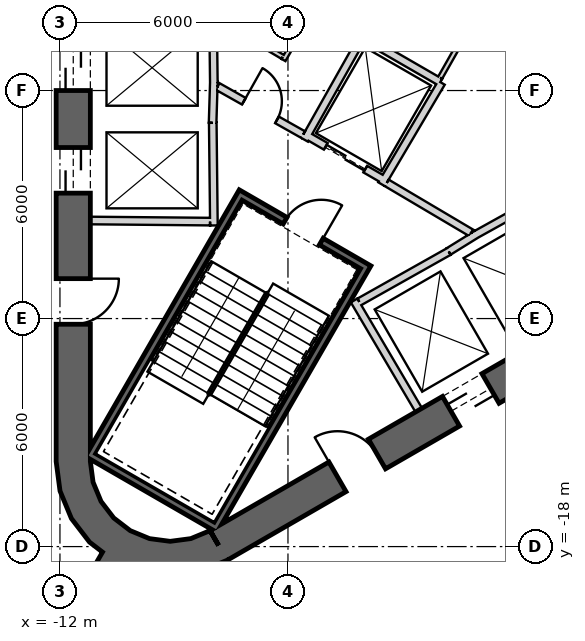
"""IFC4 building model, lengths in metres.
Left out: names, types, materials, properties, quantities, classifications, styles, units other than length and angle.
Written with IfcOpenShell. Run it as: python <this file> out.ifc"""

import sys

from ifc_helpers import new_model, si_unit, direction, frame, frame_2d, origin, place, context, subcontext, project, spatial, polyline, rectangle, outline, extrude, element, fill, save


model = new_model("IFC4")
c1 = context("Model", 3, precision=1e-05, world=origin(), true_north=direction((0.0, 1.0)))
c2 = subcontext(c1, "Body", "Model", "MODEL_VIEW")
j1 = project(units=[si_unit("LENGTHUNIT", "METRE"), si_unit("PLANEANGLEUNIT", "RADIAN")], contexts=[c1])
p1 = place(None, origin())
s1 = spatial("IfcSite", under=j1, at=p1, CompositionType="ELEMENT")
p2 = place(p1, origin())
s2 = spatial("IfcBuilding", under=s1, at=p2, CompositionType="ELEMENT")
p3 = place(p2, frame((0.0, 0.0, 265.2)))
s3 = spatial("IfcBuildingStorey", under=s2, at=p3, CompositionType="ELEMENT", Elevation=265.2)
p4 = place(p3, frame((-11.65, 15.762, 0.0), z_axis=(0.0, 0.0, 1.0), x_axis=(0.0, -1.0, 0.0)))
e1 = element("IfcWall", 1, at=p4, inside=s3, PredefinedType="SHEAR", context=c2, shape_type="SweptSolid", body=[
    extrude(rectangle(XDim=31.523, YDim=0.9, at=frame_2d((15.762, 0.0))), origin(), (0.0, 0.0, 1.0), 4.0),
])
p5 = place(p4, frame((7.062, 0.0, 0.0)))
e2 = element("IfcOpeningElement", 2, at=p5, cuts=e1, PredefinedType="OPENING", context=c2, shape_type="SweptSolid", body=[
    extrude(rectangle(XDim=1.2, YDim=2.4, at=frame_2d((0.6, 1.2))), frame((0.0, 0.46, 0.0), z_axis=(0.0, -1.0, 0.0), x_axis=(1.0, 0.0, 0.0)), (0.0, 0.0, 1.0), 0.92),
])
p6 = place(p4, frame((9.762, 0.0, 0.0)))
e3 = element("IfcOpeningElement", 3, at=p6, cuts=e1, PredefinedType="OPENING", context=c2, shape_type="SweptSolid", body=[
    extrude(rectangle(XDim=1.2, YDim=2.4, at=frame_2d((0.6, 1.2))), frame((0.0, 0.46, 0.0), z_axis=(0.0, -1.0, 0.0), x_axis=(1.0, 0.0, 0.0)), (0.0, 0.0, 1.0), 0.92),
])
p7 = place(p4, frame((12.462, 0.0, 0.0)))
e4 = element("IfcOpeningElement", 4, at=p7, cuts=e1, PredefinedType="OPENING", context=c2, shape_type="SweptSolid", body=[
    extrude(rectangle(XDim=1.2, YDim=2.4, at=frame_2d((0.6, 1.2))), frame((0.0, 0.46, 0.0), z_axis=(0.0, -1.0, 0.0), x_axis=(1.0, 0.0, 0.0)), (0.0, 0.0, 1.0), 0.92),
])
p8 = place(p4, frame((15.162, 0.0, 0.0)))
e5 = element("IfcOpeningElement", 5, at=p8, cuts=e1, PredefinedType="OPENING", context=c2, shape_type="SweptSolid", body=[
    extrude(rectangle(XDim=1.2, YDim=2.4, at=frame_2d((0.6, 1.2))), frame((0.0, 0.46, 0.0), z_axis=(0.0, -1.0, 0.0), x_axis=(1.0, 0.0, 0.0)), (0.0, 0.0, 1.0), 0.92),
])
p9 = place(p4, frame((17.862, 0.0, 0.0)))
e6 = element("IfcOpeningElement", 6, at=p9, cuts=e1, PredefinedType="OPENING", context=c2, shape_type="SweptSolid", body=[
    extrude(rectangle(XDim=1.2, YDim=2.4, at=frame_2d((0.6, 1.2))), frame((0.0, 0.46, 0.0), z_axis=(0.0, -1.0, 0.0), x_axis=(1.0, 0.0, 0.0)), (0.0, 0.0, 1.0), 0.92),
])
p10 = place(p4, frame((20.562, 0.0, 0.0)))
e7 = element("IfcOpeningElement", 7, at=p10, cuts=e1, PredefinedType="OPENING", context=c2, shape_type="SweptSolid", body=[
    extrude(rectangle(XDim=1.2, YDim=2.4, at=frame_2d((0.6, 1.2))), frame((0.0, 0.46, 0.0), z_axis=(0.0, -1.0, 0.0), x_axis=(1.0, 0.0, 0.0)), (0.0, 0.0, 1.0), 0.92),
])
p11 = place(p4, frame((23.262, 0.0, 0.0)))
e8 = element("IfcOpeningElement", 8, at=p11, cuts=e1, PredefinedType="OPENING", context=c2, shape_type="SweptSolid", body=[
    extrude(rectangle(XDim=1.2, YDim=2.4, at=frame_2d((0.6, 1.2))), frame((0.0, 0.46, 0.0), z_axis=(0.0, -1.0, 0.0), x_axis=(1.0, 0.0, 0.0)), (0.0, 0.0, 1.0), 0.92),
])
p12 = place(p4, frame((3.612, 0.0, 0.0)))
e9 = element("IfcOpeningElement", 9, at=p12, cuts=e1, PredefinedType="OPENING", context=c2, shape_type="SweptSolid", body=[
    extrude(rectangle(XDim=1.2, YDim=2.4, at=frame_2d((0.6, 1.2))), frame((0.0, 0.46, 0.0), z_axis=(0.0, -1.0, 0.0), x_axis=(1.0, 0.0, 0.0)), (0.0, 0.0, 1.0), 0.92),
])
p13 = place(p4, frame((26.712, 0.0, 0.0)))
e10 = element("IfcOpeningElement", 10, at=p13, cuts=e1, PredefinedType="OPENING", context=c2, shape_type="SweptSolid", body=[
    extrude(rectangle(XDim=1.2, YDim=2.4, at=frame_2d((0.6, 1.2))), frame((0.0, 0.46, 0.0), z_axis=(0.0, -1.0, 0.0), x_axis=(1.0, 0.0, 0.0)), (0.0, 0.0, 1.0), 0.92),
])
p14 = place(p3, frame((-7.825, -17.97, 0.0), z_axis=(0.0, 0.0, 1.0), x_axis=(0.866028369851, 0.499994862586, 0.0)))
e11 = element("IfcWall", 11, at=p14, inside=s3, PredefinedType="SHEAR", context=c2, shape_type="SweptSolid", body=[
    extrude(rectangle(XDim=31.523, YDim=0.9, at=frame_2d((15.762, 0.0))), origin(), (0.0, 0.0, 1.0), 4.0),
])
p15 = place(p14, frame((7.062, 0.0, 0.0)))
e12 = element("IfcOpeningElement", 12, at=p15, cuts=e11, PredefinedType="OPENING", context=c2, shape_type="SweptSolid", body=[
    extrude(rectangle(XDim=1.2, YDim=2.4, at=frame_2d((0.6, 1.2))), frame((0.0, 0.46, 0.0), z_axis=(0.0, -1.0, 0.0), x_axis=(1.0, 0.0, 0.0)), (0.0, 0.0, 1.0), 0.92),
])
p16 = place(p14, frame((9.762, 0.0, 0.0)))
e13 = element("IfcOpeningElement", 13, at=p16, cuts=e11, PredefinedType="OPENING", context=c2, shape_type="SweptSolid", body=[
    extrude(rectangle(XDim=1.2, YDim=2.4, at=frame_2d((0.6, 1.2))), frame((0.0, 0.46, 0.0), z_axis=(0.0, -1.0, 0.0), x_axis=(1.0, 0.0, 0.0)), (0.0, 0.0, 1.0), 0.92),
])
p17 = place(p14, frame((12.462, 0.0, 0.0)))
e14 = element("IfcOpeningElement", 14, at=p17, cuts=e11, PredefinedType="OPENING", context=c2, shape_type="SweptSolid", body=[
    extrude(rectangle(XDim=1.2, YDim=2.4, at=frame_2d((0.6, 1.2))), frame((0.0, 0.46, 0.0), z_axis=(0.0, -1.0, 0.0), x_axis=(1.0, 0.0, 0.0)), (0.0, 0.0, 1.0), 0.92),
])
p18 = place(p14, frame((15.162, 0.0, 0.0)))
e15 = element("IfcOpeningElement", 15, at=p18, cuts=e11, PredefinedType="OPENING", context=c2, shape_type="SweptSolid", body=[
    extrude(rectangle(XDim=1.2, YDim=2.4, at=frame_2d((0.6, 1.2))), frame((0.0, 0.46, 0.0), z_axis=(0.0, -1.0, 0.0), x_axis=(1.0, 0.0, 0.0)), (0.0, 0.0, 1.0), 0.92),
])
p19 = place(p14, frame((17.862, 0.0, 0.0)))
e16 = element("IfcOpeningElement", 16, at=p19, cuts=e11, PredefinedType="OPENING", context=c2, shape_type="SweptSolid", body=[
    extrude(rectangle(XDim=1.2, YDim=2.4, at=frame_2d((0.6, 1.2))), frame((0.0, 0.46, 0.0), z_axis=(0.0, -1.0, 0.0), x_axis=(1.0, 0.0, 0.0)), (0.0, 0.0, 1.0), 0.92),
])
p20 = place(p14, frame((20.562, 0.0, 0.0)))
e17 = element("IfcOpeningElement", 17, at=p20, cuts=e11, PredefinedType="OPENING", context=c2, shape_type="SweptSolid", body=[
    extrude(rectangle(XDim=1.2, YDim=2.4, at=frame_2d((0.6, 1.2))), frame((0.0, 0.46, 0.0), z_axis=(0.0, -1.0, 0.0), x_axis=(1.0, 0.0, 0.0)), (0.0, 0.0, 1.0), 0.92),
])
p21 = place(p14, frame((26.712, 0.0, 0.0)))
e18 = element("IfcOpeningElement", 18, at=p21, cuts=e11, PredefinedType="OPENING", context=c2, shape_type="SweptSolid", body=[
    extrude(rectangle(XDim=1.2, YDim=2.4, at=frame_2d((0.6, 1.2))), frame((0.0, 0.46, 0.0), z_axis=(0.0, -1.0, 0.0), x_axis=(1.0, 0.0, 0.0)), (0.0, 0.0, 1.0), 0.92),
])
p22 = place(p14, frame((3.612, 0.0, 0.0)))
e19 = element("IfcOpeningElement", 19, at=p22, cuts=e11, PredefinedType="OPENING", context=c2, shape_type="SweptSolid", body=[
    extrude(rectangle(XDim=1.2, YDim=2.4, at=frame_2d((0.6, 1.2))), frame((0.0, 0.46, 0.0), z_axis=(0.0, -1.0, 0.0), x_axis=(1.0, 0.0, 0.0)), (0.0, 0.0, 1.0), 0.92),
])
p23 = place(p3, origin())
e20 = element("IfcWall", 20, at=p23, inside=s3, PredefinedType="SHEAR", context=c2, shape_type="SweptSolid", body=[
    extrude(outline(polyline([(-12.1, -15.762), (-11.998, -16.538), (-11.698, -17.262), (-11.221, -17.883), (-10.6, -18.36), (-9.876, -18.659), (-9.1, -18.762), (-8.323, -18.659), (-7.6, -18.36), (-8.05, -17.58), (-8.556, -17.79), (-9.1, -17.862), (-9.644, -17.79), (-10.15, -17.58), (-10.585, -17.247), (-10.919, -16.812), (-11.128, -16.305), (-11.2, -15.762), (-12.1, -15.762)])), origin(), (0.0, 0.0, 1.0), 4.0),
])
p24 = place(p3, frame((-10.575, -18.316, 0.0), z_axis=(0.0, 0.0, 1.0), x_axis=(-0.500007350791, -0.866021159762, 0.0)))
e21 = element("IfcWall", 21, at=p24, inside=s3, PredefinedType="SHEAR", context=c2, shape_type="SweptSolid", body=[
    extrude(rectangle(XDim=9.965, YDim=0.7, at=frame_2d((4.982, 0.0))), origin(), (0.0, 0.0, 1.0), 4.0),
])
p25 = place(p3, frame((-7.95, -5.772, 0.0), z_axis=(0.0, 0.0, 1.0), x_axis=(-0.030803413295, -0.999525462272, 0.0)))
e22 = element("IfcWall", 22, at=p25, inside=s3, PredefinedType="PLUMBINGWALL", context=c2, shape_type="SweptSolid", body=[
    extrude(rectangle(XDim=1.078, YDim=0.2, at=frame_2d((0.539, 0.0))), origin(), (0.0, 0.0, 1.0), 3.7),
])
p26 = place(p3, frame((-7.971, -4.05, 0.0), z_axis=(0.0, 0.0, 1.0), x_axis=(0.012042535896, -0.999927486035, 0.0)))
e23 = element("IfcWall", 23, at=p26, inside=s3, PredefinedType="PLUMBINGWALL", context=c2, shape_type="SweptSolid", body=[
    extrude(rectangle(XDim=1.845, YDim=0.2, at=frame_2d((0.922, 0.0))), origin(), (0.0, 0.0, 1.0), 3.7),
])
p27 = place(p3, frame((-7.979, -6.85, 0.0), z_axis=(0.0, 0.0, 1.0), x_axis=(0.011121475088, -0.999938154483, 0.0)))
e24 = element("IfcWall", 24, at=p27, inside=s3, PredefinedType="PLUMBINGWALL", context=c2, shape_type="SweptSolid", body=[
    extrude(rectangle(XDim=2.7, YDim=0.2, at=frame_2d((1.35, 0.0))), origin(), (0.0, 0.0, 1.0), 3.7),
])
p28 = place(p3, frame((-8.05, -9.449, 0.0), z_axis=(0.0, 0.0, 1.0), x_axis=(-0.999957467379, 0.009222983926, 0.0)))
e25 = element("IfcWall", 25, at=p28, inside=s3, PredefinedType="PLUMBINGWALL", context=c2, shape_type="SweptSolid", body=[
    extrude(rectangle(XDim=3.15, YDim=0.2, at=frame_2d((1.575, 0.0))), origin(), (0.0, 0.0, 1.0), 3.7),
])
p29 = place(p3, frame((-2.558, -14.409, 0.0), z_axis=(0.0, 0.0, 1.0), x_axis=(-0.507997497166, 0.861358544901, 0.0)))
e26 = element("IfcWall", 26, at=p29, inside=s3, PredefinedType="PLUMBINGWALL", context=c2, shape_type="SweptSolid", body=[
    extrude(rectangle(XDim=3.35, YDim=0.2, at=frame_2d((1.675, 0.0))), origin(), (0.0, 0.0, 1.0), 3.7),
])
p30 = place(p3, frame((-1.769, -10.237, 0.0), z_axis=(0.0, 0.0, 1.0), x_axis=(-0.871534483978, -0.490334215854, 0.0)))
e27 = element("IfcWall", 27, at=p30, inside=s3, PredefinedType="PLUMBINGWALL", context=c2, shape_type="SweptSolid", body=[
    extrude(rectangle(XDim=2.7, YDim=0.2, at=frame_2d((1.35, 0.0))), origin(), (0.0, 0.0, 1.0), 3.7),
])
p31 = place(p3, frame((-1.024, -9.771, 0.0), z_axis=(0.0, 0.0, 1.0), x_axis=(-0.850348075135, -0.526220629693, 0.0)))
e28 = element("IfcWall", 28, at=p31, inside=s3, PredefinedType="PLUMBINGWALL", context=c2, shape_type="SweptSolid", body=[
    extrude(rectangle(XDim=0.878, YDim=0.2, at=frame_2d((0.439, 0.0))), origin(), (0.0, 0.0, 1.0), 3.7),
])
p32 = place(p3, frame((-1.13, -9.831, 0.0), z_axis=(0.0, 0.0, 1.0), x_axis=(0.874269620932, 0.485440655401, 0.0)))
e29 = element("IfcWall", 29, at=p32, inside=s3, PredefinedType="PLUMBINGWALL", context=c2, shape_type="SweptSolid", body=[
    extrude(rectangle(XDim=1.845, YDim=0.2, at=frame_2d((0.922, 0.0))), origin(), (0.0, 0.0, 1.0), 3.7),
])
p33 = place(p3, frame((-3.905, -10.563, -0.3), z_axis=(0.0, 0.0, 1.0), x_axis=(-0.500012932018, -0.866017937352, 0.0)))
e30 = element("IfcWall", 30, at=p33, inside=s3, PredefinedType="SHEAR", context=c2, shape_type="SweptSolid", body=[
    extrude(rectangle(XDim=8.1, YDim=0.2, at=frame_2d((4.05, 0.0))), origin(), (0.0, 0.0, 1.0), 4.0),
])
p34 = place(p3, frame((-11.282, -15.541, -0.3), z_axis=(0.0, 0.0, 1.0), x_axis=(0.866000483506, -0.500043160704, 0.0)))
e31 = element("IfcWall", 31, at=p34, inside=s3, PredefinedType="SHEAR", context=c2, shape_type="SweptSolid", body=[
    extrude(rectangle(XDim=3.8, YDim=0.2, at=frame_2d((1.9, 0.0))), origin(), (0.0, 0.0, 1.0), 4.0),
])
p35 = place(p3, frame((-7.196, -8.663, -0.3), z_axis=(0.0, 0.0, 1.0), x_axis=(-0.499997992926, -0.866026562566, 0.0)))
e32 = element("IfcWall", 32, at=p35, inside=s3, PredefinedType="SHEAR", context=c2, shape_type="SweptSolid", body=[
    extrude(rectangle(XDim=7.9, YDim=0.2, at=frame_2d((3.95, 0.0))), origin(), (0.0, 0.0, 1.0), 4.0),
])
p36 = place(p3, frame((-4.041, -10.599, -0.3), z_axis=(0.0, 0.0, 1.0), x_axis=(-0.866047807691, 0.499961193289, 0.0)))
e33 = element("IfcWall", 33, at=p36, inside=s3, PredefinedType="SHEAR", context=c2, shape_type="SweptSolid", body=[
    extrude(rectangle(XDim=3.6, YDim=0.2, at=frame_2d((1.8, 0.0))), origin(), (0.0, 0.0, 1.0), 4.0),
])
p37 = place(p36, frame((1.25, 0.0, 0.3)))
e34 = element("IfcOpeningElement", 34, at=p37, cuts=e33, PredefinedType="OPENING", context=c2, shape_type="SweptSolid", body=[
    extrude(rectangle(XDim=1.1, YDim=2.1, at=frame_2d((0.55, 1.05))), frame((0.0, 0.11, 0.0), z_axis=(0.0, -1.0, 0.0), x_axis=(1.0, 0.0, 0.0)), (0.0, 0.0, 1.0), 0.22),
])
p38 = place(p3, frame((-3.446, -8.368, 0.0), z_axis=(0.0, 0.0, 1.0), x_axis=(-0.866024647952, 0.500001309137, 0.0)))
e35 = element("IfcWall", 35, at=p38, inside=s3, PredefinedType="PLUMBINGWALL", context=c2, shape_type="SweptSolid", body=[
    extrude(rectangle(XDim=2.4, YDim=0.2, at=frame_2d((1.2, 0.0))), origin(), (0.0, 0.0, 1.0), 3.7),
])
p39 = place(p38, frame((0.6, 0.0, 0.0)))
e36 = element("IfcOpeningElement", 36, at=p39, cuts=e35, PredefinedType="OPENING", context=c2, shape_type="SweptSolid", body=[
    extrude(rectangle(XDim=1.2, YDim=2.4, at=frame_2d((0.6, 1.2))), frame((0.0, 0.11, 0.0), z_axis=(0.0, -1.0, 0.0), x_axis=(1.0, 0.0, 0.0)), (0.0, 0.0, 1.0), 0.22),
])
p40 = place(p3, frame((-1.961, -5.796, 0.0), z_axis=(0.0, 0.0, 1.0), x_axis=(-0.508647062354, -0.860975125052, 0.0)))
e37 = element("IfcWall", 37, at=p40, inside=s3, PredefinedType="PLUMBINGWALL", context=c2, shape_type="SweptSolid", body=[
    extrude(rectangle(XDim=3.1, YDim=0.2, at=frame_2d((1.55, 0.0))), origin(), (0.0, 0.0, 1.0), 3.7),
])
p41 = place(p3, frame((-3.99, -4.509, 0.0), z_axis=(0.0, 0.0, 1.0), x_axis=(-0.491358283181, -0.870957540612, 0.0)))
e38 = element("IfcWall", 38, at=p41, inside=s3, PredefinedType="PLUMBINGWALL", context=c2, shape_type="SweptSolid", body=[
    extrude(rectangle(XDim=3.2, YDim=0.2, at=frame_2d((1.6, 0.0))), origin(), (0.0, 0.0, 1.0), 3.7),
])
p42 = place(p3, frame((-3.953, -4.646, 0.0), z_axis=(0.0, 0.0, 1.0), x_axis=(0.866065302921, -0.4999308863, 0.0)))
e39 = element("IfcWall", 39, at=p42, inside=s3, PredefinedType="PLUMBINGWALL", context=c2, shape_type="SweptSolid", body=[
    extrude(rectangle(XDim=2.264, YDim=0.2, at=frame_2d((1.132, 0.0))), origin(), (0.0, 0.0, 1.0), 3.7),
])
p43 = place(p3, frame((-3.401, -8.43, 0.0), z_axis=(0.0, 0.0, 1.0), x_axis=(0.860615607571, -0.509255118781, 0.0)))
e40 = element("IfcWall", 40, at=p43, inside=s3, PredefinedType="PARTITIONING", context=c2, shape_type="SweptSolid", body=[
    extrude(rectangle(XDim=2.581, YDim=0.2, at=frame_2d((1.29, 0.0))), origin(), (0.0, 0.0, 1.0), 3.7),
])
p44 = place(p3, frame((-7.849, -5.894, 0.0), z_axis=(0.0, 0.0, 1.0), x_axis=(0.871363259478, -0.490638431059, 0.0)))
e41 = element("IfcWall", 41, at=p44, inside=s3, PredefinedType="PARTITIONING", context=c2, shape_type="SweptSolid", body=[
    extrude(rectangle(XDim=2.581, YDim=0.2, at=frame_2d((1.291, 0.0))), origin(), (0.0, 0.0, 1.0), 3.7),
])
p45 = place(p44, frame((0.791, 0.0, 0.0)))
e42 = element("IfcOpeningElement", 42, at=p45, cuts=e41, PredefinedType="OPENING", context=c2, shape_type="SweptSolid", body=[
    extrude(rectangle(XDim=1.0, YDim=2.1, at=frame_2d((0.5, 1.05))), frame((0.0, 0.11, 0.0), z_axis=(0.0, -1.0, 0.0), x_axis=(1.0, 0.0, 0.0)), (0.0, 0.0, 1.0), 0.22),
])
p46 = place(p3, frame((0.029, -2.099, 0.0), z_axis=(0.0, 0.0, 1.0), x_axis=(-0.49376265119, -0.869596713592, 0.0)))
e43 = element("IfcWall", 43, at=p46, inside=s3, PredefinedType="PARTITIONING", context=c2, shape_type="SweptSolid", body=[
    extrude(rectangle(XDim=4.097, YDim=0.12, at=frame_2d((2.048, 0.0))), origin(), (0.0, 0.0, 1.0), 3.7),
])
p47 = place(p46, frame((1.7, 0.0, 0.0)))
e44 = element("IfcOpeningElement", 44, at=p47, cuts=e43, PredefinedType="OPENING", context=c2, shape_type="SweptSolid", body=[
    extrude(rectangle(XDim=0.8, YDim=2.1, at=frame_2d((0.4, 1.05))), frame((0.0, 0.07, 0.0), z_axis=(0.0, -1.0, 0.0), x_axis=(1.0, 0.0, 0.0)), (0.0, 0.0, 1.0), 0.14),
])
p48 = place(p3, frame((-6.118, -5.197, 0.0), z_axis=(0.0, 0.0, 1.0), x_axis=(0.499979045085, 0.866037501772, 0.0)))
e45 = element("IfcWall", 45, at=p48, inside=s3, PredefinedType="PARTITIONING", context=c2, shape_type="SweptSolid", body=[
    extrude(rectangle(XDim=3.679, YDim=0.12, at=frame_2d((1.839, 0.0))), origin(), (0.0, 0.0, 1.0), 3.7),
])
p49 = place(p48, frame((1.16, 0.0, 0.0)))
e46 = element("IfcOpeningElement", 46, at=p49, cuts=e45, PredefinedType="OPENING", context=c2, shape_type="SweptSolid", body=[
    extrude(rectangle(XDim=0.8, YDim=2.1, at=frame_2d((0.4, 1.05))), frame((0.0, 0.07, 0.0), z_axis=(0.0, -1.0, 0.0), x_axis=(1.0, 0.0, 0.0)), (0.0, 0.0, 1.0), 0.14),
])
p50 = place(p3, frame((-7.95, -4.041, 0.0), z_axis=(0.0, 0.0, 1.0), x_axis=(0.860112457103, -0.510104461004, 0.0)))
e47 = element("IfcWall", 47, at=p50, inside=s3, PredefinedType="PARTITIONING", context=c2, shape_type="SweptSolid", body=[
    extrude(rectangle(XDim=2.104, YDim=0.12, at=frame_2d((1.052, 0.0))), origin(), (0.0, 0.0, 1.0), 3.7),
])
p51 = place(p3, frame((-6.366, -22.266, 0.0), z_axis=(0.0, 0.0, 1.0), x_axis=(0.866027932408, 0.49999562027, 0.0)))
e48 = element("IfcWall", 48, at=p51, inside=s3, PredefinedType="PARTITIONING", context=c2, shape_type="SweptSolid", body=[
    extrude(rectangle(XDim=18.697, YDim=0.2, at=frame_2d((9.348, 0.0))), origin(), (0.0, 0.0, 1.0), 2.98),
])
p52 = place(p37, origin())
e49 = element("IfcDoor", 49, at=p52, inside=s3, OperationType="SINGLE_SWING_RIGHT", PredefinedType="USERDEFINED", context=c2, shape_type="SweptSolid", body=[
    extrude(rectangle(XDim=1.1, YDim=2.1, at=frame_2d((0.55, 1.05))), frame((0.0, 0.025, 0.0), z_axis=(0.0, -1.0, 0.0), x_axis=(1.0, 0.0, 0.0)), (0.0, 0.0, 1.0), 0.05),
])
fill(e34, e49)
p53 = place(p45, origin())
e50 = element("IfcDoor", 50, at=p53, inside=s3, OperationType="SINGLE_SWING_RIGHT", PredefinedType="USERDEFINED", context=c2, shape_type="SweptSolid", body=[
    extrude(rectangle(XDim=1.0, YDim=2.1, at=frame_2d((0.5, 1.05))), frame((0.0, 0.025, 0.0), z_axis=(0.0, -1.0, 0.0), x_axis=(1.0, 0.0, 0.0)), (0.0, 0.0, 1.0), 0.05),
])
fill(e42, e50)
p54 = place(p39, origin())
e51 = element("IfcDoor", 51, at=p54, inside=s3, OperationType="SLIDING_TO_LEFT", PredefinedType="USERDEFINED", context=c2, shape_type="SweptSolid", body=[
    extrude(rectangle(XDim=1.2, YDim=2.4, at=frame_2d((0.6, 1.2))), frame((0.0, 0.025, 0.0), z_axis=(0.0, -1.0, 0.0), x_axis=(1.0, 0.0, 0.0)), (0.0, 0.0, 1.0), 0.05),
])
fill(e36, e51)
p55 = place(p10, origin())
e52 = element("IfcDoor", 52, at=p55, inside=s3, OperationType="SLIDING_TO_LEFT", PredefinedType="USERDEFINED", context=c2, shape_type="SweptSolid", body=[
    extrude(rectangle(XDim=1.2, YDim=2.4, at=frame_2d((0.6, 1.2))), frame((0.0, 0.025, 0.0), z_axis=(0.0, -1.0, 0.0), x_axis=(1.0, 0.0, 0.0)), (0.0, 0.0, 1.0), 0.05),
])
fill(e7, e52)
p56 = place(p11, origin())
e53 = element("IfcDoor", 53, at=p56, inside=s3, OperationType="SLIDING_TO_LEFT", PredefinedType="USERDEFINED", context=c2, shape_type="SweptSolid", body=[
    extrude(rectangle(XDim=1.2, YDim=2.4, at=frame_2d((0.6, 1.2))), frame((0.0, 0.025, 0.0), z_axis=(0.0, -1.0, 0.0), x_axis=(1.0, 0.0, 0.0)), (0.0, 0.0, 1.0), 0.05),
])
fill(e8, e53)
p57 = place(p15, origin())
e54 = element("IfcDoor", 54, at=p57, inside=s3, OperationType="SLIDING_TO_LEFT", PredefinedType="USERDEFINED", context=c2, shape_type="SweptSolid", body=[
    extrude(rectangle(XDim=1.2, YDim=2.4, at=frame_2d((0.6, 1.2))), frame((0.0, 0.025, 0.0), z_axis=(0.0, -1.0, 0.0), x_axis=(1.0, 0.0, 0.0)), (0.0, 0.0, 1.0), 0.05),
])
fill(e12, e54)
p58 = place(p13, origin())
e55 = element("IfcDoor", 55, at=p58, inside=s3, OperationType="SINGLE_SWING_RIGHT", PredefinedType="USERDEFINED", context=c2, shape_type="SweptSolid", body=[
    extrude(rectangle(XDim=1.2, YDim=2.4, at=frame_2d((0.6, 1.2))), frame((0.0, 0.025, 0.0), z_axis=(0.0, -1.0, 0.0), x_axis=(1.0, 0.0, 0.0)), (0.0, 0.0, 1.0), 0.05),
])
fill(e10, e55)
p59 = place(p22, origin())
e56 = element("IfcDoor", 56, at=p59, inside=s3, OperationType="SINGLE_SWING_RIGHT", PredefinedType="USERDEFINED", context=c2, shape_type="SweptSolid", body=[
    extrude(rectangle(XDim=1.2, YDim=2.4, at=frame_2d((0.6, 1.2))), frame((0.0, 0.025, 0.0), z_axis=(0.0, -1.0, 0.0), x_axis=(1.0, 0.0, 0.0)), (0.0, 0.0, 1.0), 0.05),
])
fill(e19, e56)
save(model, sys.argv[1])
